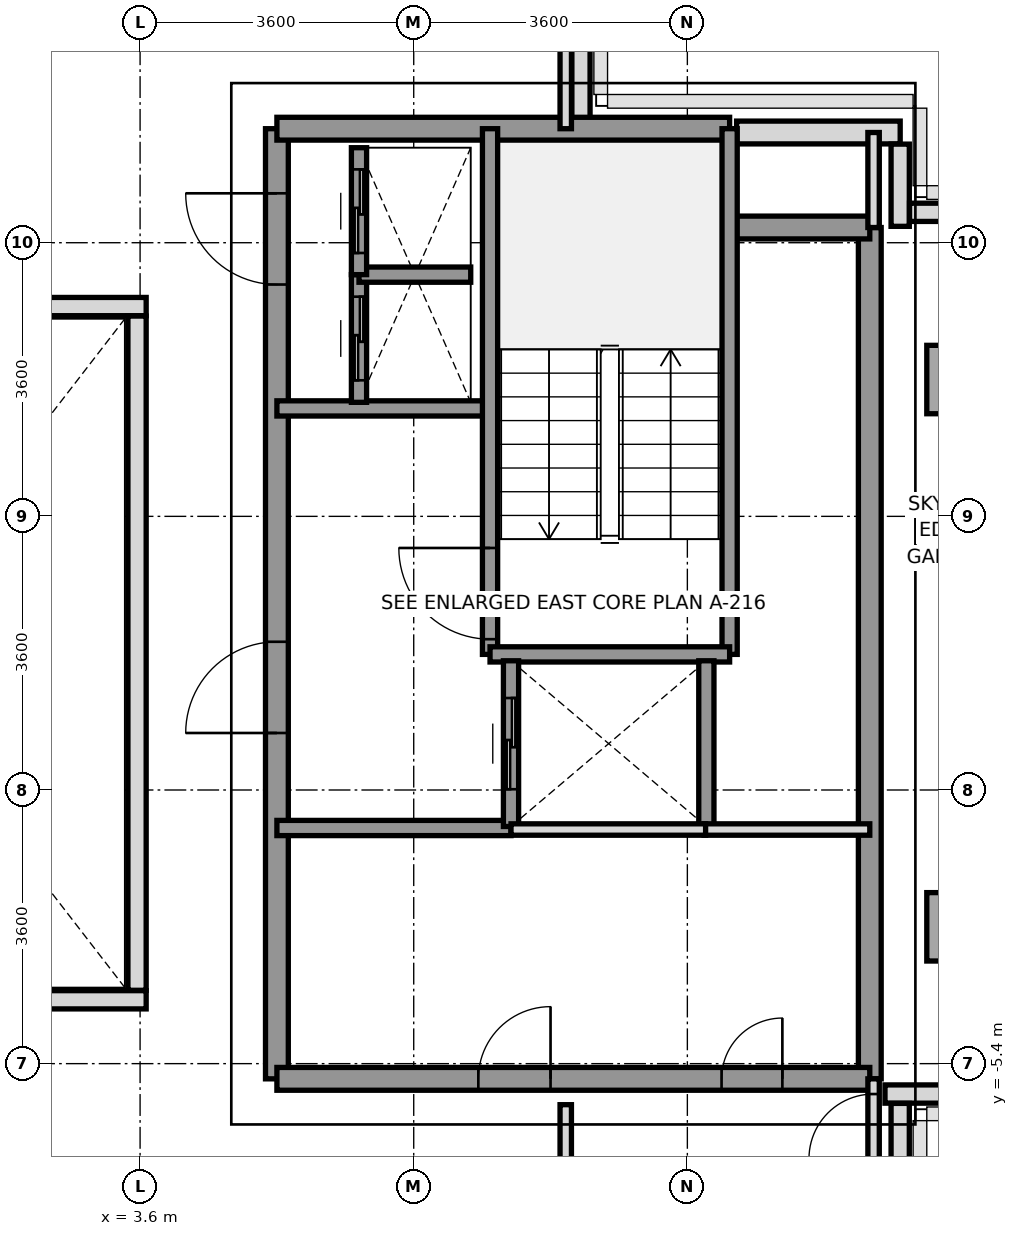
"""IFC4 building model, lengths in metres.
Left out: names, types, materials, properties, quantities, classifications, styles, units other than length and angle.
Written with IfcOpenShell. Run it as: python <this file> out.ifc"""

import sys

from ifc_helpers import new_model, si_unit, direction, frame, frame_2d, origin, origin_2d, place, context, subcontext, project, spatial, rectangle, extrude, source, transform, mapped, element, fill, save


model = new_model("IFC4")
c1 = context("Model", 3, precision=1e-05, world=origin(), true_north=direction((0.0, 1.0)))
c2 = subcontext(c1, "Body", "Model", "MODEL_VIEW")
j1 = project(units=[si_unit("LENGTHUNIT", "METRE"), si_unit("PLANEANGLEUNIT", "RADIAN")], contexts=[c1])
p1 = place(None, origin())
s1 = spatial("IfcSite", under=j1, at=p1, CompositionType="ELEMENT")
p2 = place(p1, origin())
s2 = spatial("IfcBuilding", under=s1, at=p2, CompositionType="ELEMENT")
p3 = place(p2, frame((0.0, 0.0, 252.4)))
s3 = spatial("IfcBuildingStorey", under=s2, at=p3, CompositionType="ELEMENT", Elevation=252.4)
m1 = source(origin(), c2, "Body", "SweptSolid", [
    extrude(rectangle(XDim=0.9, YDim=0.9, at=origin_2d()), origin(), (0.0, 0.0, 1.0), 3.01),
])
for number, where, z_axis, x_axis in (
    (1, (14.4, -3.6, 0.0), (0.0, 0.0, 1.0), (1.0, 0.0, 0.0)),
    (2, (14.4, 3.6, 0.0), (0.0, 0.0, 1.0), (1.0, 0.0, 0.0)),
):
    element("IfcColumn", number, at=place(p3, frame(where, z_axis=z_axis, x_axis=x_axis)), inside=s3, PredefinedType="COLUMN", context=c2, shape_type="MappedRepresentation", body=[
        mapped(m1, transform((0.0, 0.0, 0.0), x_axis=(1.0, 0.0, 0.0), y_axis=(0.0, 1.0, 0.0), z_axis=(0.0, 0.0, 1.0), scale=1.0)),
    ])
p4 = place(p3, frame((11.448, 6.85, 0.0), z_axis=(0.0, 0.0, 1.0), x_axis=(1.0, 0.0, 0.0)))
e3 = element("IfcWall", 3, at=p4, inside=s3, PredefinedType="SOLIDWALL", context=c2, shape_type="SweptSolid", body=[
    extrude(rectangle(XDim=2.152, YDim=0.3, at=frame_2d((1.076, 0.0))), origin(), (0.0, 0.0, 1.0), 3.01),
])
p5 = place(p3, frame((14.677, -5.8, 0.0), z_axis=(0.0, 0.0, 1.0), x_axis=(-1.0, 0.0, 0.0)))
e4 = element("IfcWall", 4, at=p5, inside=s3, PredefinedType="PARAPET", context=c2, shape_type="SweptSolid", body=[
    extrude(rectangle(XDim=1.277, YDim=0.24, at=frame_2d((0.639, 0.0))), origin(), (0.0, 0.0, 1.0), 1.15),
])
p6 = place(p3, frame((13.6, -5.923, 0.0), z_axis=(0.0, 0.0, 1.0), x_axis=(0.0, -1.0, 0.0)))
e5 = element("IfcWall", 5, at=p6, inside=s3, PredefinedType="PARAPET", context=c2, shape_type="SweptSolid", body=[
    extrude(rectangle(XDim=1.077, YDim=0.24, at=frame_2d((0.539, 0.0))), origin(), (0.0, 0.0, 1.0), 1.15),
])
p7 = place(p3, frame((9.4, 8.622, 0.0), z_axis=(0.0, 0.0, 1.0), x_axis=(0.0, -1.0, 0.0)))
e6 = element("IfcWall", 6, at=p7, inside=s3, PredefinedType="PARAPET", context=c2, shape_type="SweptSolid", body=[
    extrude(rectangle(XDim=1.669, YDim=0.24, at=frame_2d((0.834, 0.0))), origin(), (0.0, 0.0, 1.0), 1.15),
])
p8 = place(p3, frame((13.6, 6.697, 0.0), z_axis=(0.0, 0.0, 1.0), x_axis=(0.0, -1.0, 0.0)))
e7 = element("IfcWall", 7, at=p8, inside=s3, PredefinedType="PARAPET", context=c2, shape_type="SweptSolid", body=[
    extrude(rectangle(XDim=1.082, YDim=0.24, at=frame_2d((0.541, 0.0))), origin(), (0.0, 0.0, 1.0), 1.15),
])
p9 = place(p3, frame((13.723, 5.8, 0.0), z_axis=(0.0, 0.0, 1.0), x_axis=(1.0, 0.0, 0.0)))
e8 = element("IfcWall", 8, at=p9, inside=s3, PredefinedType="PARAPET", context=c2, shape_type="SweptSolid", body=[
    extrude(rectangle(XDim=1.077, YDim=0.24, at=frame_2d((0.539, 0.0))), origin(), (0.0, 0.0, 1.0), 1.15),
])
p10 = place(p3, frame((13.2, -5.6, 0.0), z_axis=(0.0, 0.0, 1.0), x_axis=(0.0, 1.0, 0.0)))
e9 = element("IfcWall", 9, at=p10, inside=s3, PredefinedType="SHEAR", context=c2, shape_type="SweptSolid", body=[
    extrude(rectangle(XDim=11.2, YDim=0.3, at=frame_2d((5.6, 0.0))), origin(), (0.0, 0.0, 1.0), 3.01),
])
p11 = place(p3, frame((5.4, -5.6, 0.0), z_axis=(0.0, 0.0, 1.0), x_axis=(0.0, 1.0, 0.0)))
e10 = element("IfcWall", 10, at=p11, inside=s3, PredefinedType="SHEAR", context=c2, shape_type="SweptSolid", body=[
    extrude(rectangle(XDim=12.5, YDim=0.3, at=frame_2d((6.25, 0.0))), origin(), (0.0, 0.0, 1.0), 3.01),
])
p12 = place(p11, frame((4.55, 0.0, 0.0)))
e11 = element("IfcOpeningElement", 11, at=p12, cuts=e10, PredefinedType="OPENING", context=c2, shape_type="SweptSolid", body=[
    extrude(rectangle(XDim=1.2, YDim=2.2, at=frame_2d((0.6, 1.1))), frame((0.0, 0.16, 0.0), z_axis=(0.0, -1.0, 0.0), x_axis=(1.0, 0.0, 0.0)), (0.0, 0.0, 1.0), 0.32),
])
p13 = place(p11, frame((10.45, 0.0, 0.0)))
e12 = element("IfcOpeningElement", 12, at=p13, cuts=e10, PredefinedType="OPENING", context=c2, shape_type="SweptSolid", body=[
    extrude(rectangle(XDim=1.2, YDim=2.2, at=frame_2d((0.6, 1.1))), frame((0.0, 0.16, 0.0), z_axis=(0.0, -1.0, 0.0), x_axis=(1.0, 0.0, 0.0)), (0.0, 0.0, 1.0), 0.32),
])
p14 = place(p3, frame((5.4, 6.9, 0.0), z_axis=(0.0, 0.0, 1.0), x_axis=(1.0, 0.0, 0.0)))
e13 = element("IfcWall", 13, at=p14, inside=s3, PredefinedType="SHEAR", context=c2, shape_type="SweptSolid", body=[
    extrude(rectangle(XDim=5.956, YDim=0.3, at=frame_2d((2.978, 0.0))), origin(), (0.0, 0.0, 1.0), 3.01),
])
p15 = place(p3, frame((11.356, 5.6, 0.0), z_axis=(0.0, 0.0, 1.0), x_axis=(1.0, 0.0, 0.0)))
e14 = element("IfcWall", 14, at=p15, inside=s3, PredefinedType="SHEAR", context=c2, shape_type="SweptSolid", body=[
    extrude(rectangle(XDim=1.844, YDim=0.3, at=frame_2d((0.922, 0.0))), origin(), (0.0, 0.0, 1.0), 3.01),
])
p16 = place(p3, frame((5.4, -5.6, 0.0), z_axis=(0.0, 0.0, 1.0), x_axis=(1.0, 0.0, 0.0)))
e15 = element("IfcWall", 15, at=p16, inside=s3, PredefinedType="SHEAR", context=c2, shape_type="SweptSolid", body=[
    extrude(rectangle(XDim=7.8, YDim=0.3, at=frame_2d((3.9, 0.0))), origin(), (0.0, 0.0, 1.0), 3.01),
])
p17 = place(p16, frame((5.85, 0.0, 0.0)))
e16 = element("IfcOpeningElement", 16, at=p17, cuts=e15, PredefinedType="OPENING", context=c2, shape_type="SweptSolid", body=[
    extrude(rectangle(XDim=0.8, YDim=2.1, at=frame_2d((0.4, 1.05))), frame((0.0, 0.16, 0.0), z_axis=(0.0, -1.0, 0.0), x_axis=(1.0, 0.0, 0.0)), (0.0, 0.0, 1.0), 0.32),
])
p18 = place(p16, frame((2.65, 0.0, 0.0)))
e17 = element("IfcOpeningElement", 17, at=p18, cuts=e15, PredefinedType="OPENING", context=c2, shape_type="SweptSolid", body=[
    extrude(rectangle(XDim=0.95, YDim=2.15, at=frame_2d((0.475, 1.075))), frame((0.0, 0.16, 0.0), z_axis=(0.0, -1.0, 0.0), x_axis=(1.0, 0.0, 0.0)), (0.0, 0.0, 1.0), 0.32),
])
p19 = place(p3, frame((5.4, 3.22, 0.0), z_axis=(0.0, 0.0, 1.0), x_axis=(1.0, 0.0, 0.0)))
e18 = element("IfcWall", 18, at=p19, inside=s3, PredefinedType="SOLIDWALL", context=c2, shape_type="SweptSolid", body=[
    extrude(rectangle(XDim=2.78, YDim=0.2, at=frame_2d((1.39, 0.0))), origin(), (0.0, 0.0, 1.0), 3.01),
])
p20 = place(p3, frame((5.4, -2.3, 0.0), z_axis=(0.0, 0.0, 1.0), x_axis=(1.0, 0.0, 0.0)))
e19 = element("IfcWall", 19, at=p20, inside=s3, PredefinedType="SOLIDWALL", context=c2, shape_type="SweptSolid", body=[
    extrude(rectangle(XDim=3.08, YDim=0.2, at=frame_2d((1.54, 0.0))), origin(), (0.0, 0.0, 1.0), 3.01),
])
p21 = place(p3, frame((8.204, -0.016, 0.0), z_axis=(0.0, 0.0, 1.0), x_axis=(0.0, 1.0, 0.0)))
e20 = element("IfcWall", 20, at=p21, inside=s3, PredefinedType="SOLIDWALL", context=c2, shape_type="SweptSolid", body=[
    extrude(rectangle(XDim=6.916, YDim=0.2, at=frame_2d((3.458, 0.0))), origin(), (0.0, 0.0, 1.0), 3.01),
])
p22 = place(p21, frame((0.2, 0.0, 0.0)))
e21 = element("IfcOpeningElement", 21, at=p22, cuts=e20, PredefinedType="OPENING", context=c2, shape_type="SweptSolid", body=[
    extrude(rectangle(XDim=1.2, YDim=2.2, at=frame_2d((0.6, 1.1))), frame((0.0, 0.11, 0.0), z_axis=(0.0, -1.0, 0.0), x_axis=(1.0, 0.0, 0.0)), (0.0, 0.0, 1.0), 0.22),
])
p23 = place(p3, frame((11.356, -0.016, 0.0), z_axis=(0.0, 0.0, 1.0), x_axis=(0.0, 1.0, 0.0)))
e22 = element("IfcWall", 22, at=p23, inside=s3, PredefinedType="SOLIDWALL", context=c2, shape_type="SweptSolid", body=[
    extrude(rectangle(XDim=6.916, YDim=0.2, at=frame_2d((3.458, 0.0))), origin(), (0.0, 0.0, 1.0), 3.01),
])
p24 = place(p3, frame((8.204, -0.016, 0.0), z_axis=(0.0, 0.0, 1.0), x_axis=(1.0, 0.0, 0.0)))
e23 = element("IfcWall", 23, at=p24, inside=s3, PredefinedType="SOLIDWALL", context=c2, shape_type="SweptSolid", body=[
    extrude(rectangle(XDim=3.152, YDim=0.2, at=frame_2d((1.576, 0.0))), origin(), (0.0, 0.0, 1.0), 3.01),
])
p25 = place(p3, frame((8.48, -2.28, 0.0), z_axis=(0.0, 0.0, 1.0), x_axis=(0.0, 1.0, 0.0)))
e24 = element("IfcWall", 24, at=p25, inside=s3, PredefinedType="SOLIDWALL", context=c2, shape_type="SweptSolid", body=[
    extrude(rectangle(XDim=2.18, YDim=0.2, at=frame_2d((1.09, 0.0))), origin(), (0.0, 0.0, 1.0), 3.01),
])
p26 = place(p25, frame((0.49, 0.0, 0.0)))
e25 = element("IfcOpeningElement", 25, at=p26, cuts=e24, PredefinedType="OPENING", context=c2, shape_type="SweptSolid", body=[
    extrude(rectangle(XDim=1.2, YDim=2.2, at=frame_2d((0.6, 1.1))), frame((0.0, 0.11, 0.0), z_axis=(0.0, -1.0, 0.0), x_axis=(1.0, 0.0, 0.0)), (0.0, 0.0, 1.0), 0.22),
])
p27 = place(p3, frame((11.05, -2.28, 0.0), z_axis=(0.0, 0.0, 1.0), x_axis=(0.0, 1.0, 0.0)))
e26 = element("IfcWall", 26, at=p27, inside=s3, PredefinedType="SOLIDWALL", context=c2, shape_type="SweptSolid", body=[
    extrude(rectangle(XDim=2.18, YDim=0.2, at=frame_2d((1.09, 0.0))), origin(), (0.0, 0.0, 1.0), 3.01),
])
p28 = place(p3, frame((6.48, 3.3, 0.0), z_axis=(0.0, 0.0, 1.0), x_axis=(0.0, 1.0, 0.0)))
e27 = element("IfcWall", 27, at=p28, inside=s3, PredefinedType="SOLIDWALL", context=c2, shape_type="SweptSolid", body=[
    extrude(rectangle(XDim=1.68, YDim=0.2, at=frame_2d((0.84, 0.0))), origin(), (0.0, 0.0, 1.0), 3.01),
])
p29 = place(p28, frame((0.29, 0.0, 0.0)))
e28 = element("IfcOpeningElement", 28, at=p29, cuts=e27, PredefinedType="OPENING", context=c2, shape_type="SweptSolid", body=[
    extrude(rectangle(XDim=1.1, YDim=2.2, at=frame_2d((0.55, 1.1))), frame((0.0, 0.11, 0.0), z_axis=(0.0, -1.0, 0.0), x_axis=(1.0, 0.0, 0.0)), (0.0, 0.0, 1.0), 0.22),
])
p30 = place(p3, frame((6.48, 4.98, 0.0), z_axis=(0.0, 0.0, 1.0), x_axis=(1.0, 0.0, 0.0)))
e29 = element("IfcWall", 29, at=p30, inside=s3, PredefinedType="SOLIDWALL", context=c2, shape_type="SweptSolid", body=[
    extrude(rectangle(XDim=1.47, YDim=0.2, at=frame_2d((0.735, 0.0))), origin(), (0.0, 0.0, 1.0), 3.01),
])
p31 = place(p3, frame((6.48, 4.98, 0.0), z_axis=(0.0, 0.0, 1.0), x_axis=(0.0, 1.0, 0.0)))
e30 = element("IfcWall", 30, at=p31, inside=s3, PredefinedType="SOLIDWALL", context=c2, shape_type="SweptSolid", body=[
    extrude(rectangle(XDim=1.67, YDim=0.2, at=frame_2d((0.835, 0.0))), origin(), (0.0, 0.0, 1.0), 3.01),
])
p32 = place(p31, frame((0.285, 0.0, 0.0)))
e31 = element("IfcOpeningElement", 31, at=p32, cuts=e30, PredefinedType="OPENING", context=c2, shape_type="SweptSolid", body=[
    extrude(rectangle(XDim=1.1, YDim=2.2, at=frame_2d((0.55, 1.1))), frame((0.0, 0.11, 0.0), z_axis=(0.0, -1.0, 0.0), x_axis=(1.0, 0.0, 0.0)), (0.0, 0.0, 1.0), 0.22),
])
p33 = place(p3, frame((11.02, -2.32, 0.0), z_axis=(0.0, 0.0, 1.0), x_axis=(1.0, 0.0, 0.0)))
e32 = element("IfcWall", 32, at=p33, inside=s3, PredefinedType="PARTITIONING", context=c2, shape_type="SweptSolid", body=[
    extrude(rectangle(XDim=2.18, YDim=0.15, at=frame_2d((1.09, 0.0))), origin(), (0.0, 0.0, 1.0), 3.01),
])
p34 = place(p3, frame((8.48, -2.32, 0.0), z_axis=(0.0, 0.0, 1.0), x_axis=(1.0, 0.0, 0.0)))
e33 = element("IfcWall", 33, at=p34, inside=s3, PredefinedType="PARTITIONING", context=c2, shape_type="SweptSolid", body=[
    extrude(rectangle(XDim=2.56, YDim=0.15, at=frame_2d((1.28, 0.0))), origin(), (0.0, 0.0, 1.0), 3.01),
])
p35 = place(p3, frame((9.2, 6.9, 0.0), z_axis=(0.0, 0.0, 1.0), x_axis=(0.0, 1.0, 0.0)))
e34 = element("IfcWall", 34, at=p35, inside=s3, PredefinedType="PARTITIONING", context=c2, shape_type="SweptSolid", body=[
    extrude(rectangle(XDim=3.38, YDim=0.15, at=frame_2d((1.69, 0.0))), origin(), (0.0, 0.0, 1.0), 2.61),
])
p36 = place(p3, frame((9.2, -10.28, 0.0), z_axis=(0.0, 0.0, 1.0), x_axis=(0.0, 1.0, 0.0)))
e35 = element("IfcWall", 35, at=p36, inside=s3, PredefinedType="PARTITIONING", context=c2, shape_type="SweptSolid", body=[
    extrude(rectangle(XDim=4.34, YDim=0.15, at=frame_2d((2.17, 0.0))), origin(), (0.0, 0.0, 1.0), 2.61),
])
p37 = place(p3, frame((13.25, 5.6, 0.0), z_axis=(0.0, 0.0, 1.0), x_axis=(0.0, 1.0, 0.0)))
e36 = element("IfcWall", 36, at=p37, inside=s3, PredefinedType="PARTITIONING", context=c2, shape_type="SweptSolid", body=[
    extrude(rectangle(XDim=1.25, YDim=0.15, at=frame_2d((0.625, 0.0))), origin(), (0.0, 0.0, 1.0), 3.01),
])
p38 = place(p3, frame((13.25, -6.85, 0.0), z_axis=(0.0, 0.0, 1.0), x_axis=(0.0, 1.0, 0.0)))
e37 = element("IfcWall", 37, at=p38, inside=s3, PredefinedType="PARTITIONING", context=c2, shape_type="SweptSolid", body=[
    extrude(rectangle(XDim=1.25, YDim=0.15, at=frame_2d((0.625, 0.0))), origin(), (0.0, 0.0, 1.0), 3.01),
])
p39 = place(p38, frame((0.2, 0.0, 0.0)))
e38 = element("IfcOpeningElement", 38, at=p39, cuts=e37, PredefinedType="OPENING", context=c2, shape_type="SweptSolid", body=[
    extrude(rectangle(XDim=0.85, YDim=2.1, at=frame_2d((0.425, 1.05))), frame((0.0, 0.085, 0.0), z_axis=(0.0, -1.0, 0.0), x_axis=(1.0, 0.0, 0.0)), (0.0, 0.0, 1.0), 0.17),
])
for number, where, z_axis, x_axis in (
    (39, (-3.68, -4.56, 0.0), (0.0, 0.0, 1.0), (1.0, 0.0, 0.0)),
    (40, (-3.68, 4.56, 0.0), (0.0, 0.0, 1.0), (1.0, 0.0, 0.0)),
):
    element("IfcWall", number, at=place(p3, frame(where, z_axis=z_axis, x_axis=x_axis)), inside=s3, PredefinedType="PARAPET", context=c2, shape_type="SweptSolid", body=[
        extrude(rectangle(XDim=7.36, YDim=0.24, at=frame_2d((3.68, 0.0))), origin(), (0.0, 0.0, 1.0), 1.15),
    ])
p40 = place(p3, frame((3.56, -4.435, 0.0), z_axis=(0.0, 0.0, 1.0), x_axis=(0.0, 1.0, 0.0)))
e41 = element("IfcWall", 41, at=p40, inside=s3, PredefinedType="PARAPET", context=c2, shape_type="SweptSolid", body=[
    extrude(rectangle(XDim=8.87, YDim=0.24, at=frame_2d((4.435, 0.0))), origin(), (0.0, 0.0, 1.0), 1.15),
])
m2 = source(origin(), c2, "Body", "SweptSolid", [
    extrude(rectangle(XDim=1.2, YDim=2.2, at=frame_2d((0.6, 1.1))), frame((0.0, 0.025, 0.0), z_axis=(0.0, -1.0, 0.0), x_axis=(1.0, 0.0, 0.0)), (0.0, 0.0, 1.0), 0.05),
])
p41 = place(p22, origin())
e42 = element("IfcDoor", 42, at=p41, inside=s3, OperationType="SINGLE_SWING_RIGHT", PredefinedType="DOOR", context=c2, shape_type="MappedRepresentation", body=[
    mapped(m2, transform((0.0, 0.0, 0.0), x_axis=(1.0, 0.0, 0.0), y_axis=(0.0, 1.0, 0.0), z_axis=(0.0, 0.0, 1.0), scale=1.0)),
])
fill(e21, e42)
p42 = place(p12, origin())
e43 = element("IfcDoor", 43, at=p42, inside=s3, OperationType="SINGLE_SWING_LEFT", PredefinedType="DOOR", context=c2, shape_type="MappedRepresentation", body=[
    mapped(m2, transform((0.0, 0.0, 0.0), x_axis=(1.0, 0.0, 0.0), y_axis=(0.0, 1.0, 0.0), z_axis=(0.0, 0.0, 1.0), scale=1.0)),
])
fill(e11, e43)
p43 = place(p13, origin())
e44 = element("IfcDoor", 44, at=p43, inside=s3, OperationType="SINGLE_SWING_RIGHT", PredefinedType="DOOR", context=c2, shape_type="MappedRepresentation", body=[
    mapped(m2, transform((0.0, 0.0, 0.0), x_axis=(1.0, 0.0, 0.0), y_axis=(0.0, 1.0, 0.0), z_axis=(0.0, 0.0, 1.0), scale=1.0)),
])
fill(e12, e44)
m3 = source(origin(), c2, "Body", "SweptSolid", [
    extrude(rectangle(XDim=0.8, YDim=2.1, at=frame_2d((0.4, 1.05))), frame((0.0, 0.025, 0.0), z_axis=(0.0, -1.0, 0.0), x_axis=(1.0, 0.0, 0.0)), (0.0, 0.0, 1.0), 0.05),
])
p44 = place(p17, origin())
e45 = element("IfcDoor", 45, at=p44, inside=s3, OperationType="SINGLE_SWING_RIGHT", PredefinedType="DOOR", context=c2, shape_type="MappedRepresentation", body=[
    mapped(m3, transform((0.0, 0.0, 0.0), x_axis=(1.0, 0.0, 0.0), y_axis=(0.0, 1.0, 0.0), z_axis=(0.0, 0.0, 1.0), scale=1.0)),
])
fill(e16, e45)
m4 = source(origin(), c2, "Body", "SweptSolid", [
    extrude(rectangle(XDim=0.95, YDim=2.15, at=frame_2d((0.475, 1.075))), frame((0.0, 0.025, 0.0), z_axis=(0.0, -1.0, 0.0), x_axis=(1.0, 0.0, 0.0)), (0.0, 0.0, 1.0), 0.05),
])
p45 = place(p18, origin())
e46 = element("IfcDoor", 46, at=p45, inside=s3, OperationType="SINGLE_SWING_RIGHT", PredefinedType="DOOR", context=c2, shape_type="MappedRepresentation", body=[
    mapped(m4, transform((0.0, 0.0, 0.0), x_axis=(1.0, 0.0, 0.0), y_axis=(0.0, 1.0, 0.0), z_axis=(0.0, 0.0, 1.0), scale=1.0)),
])
fill(e17, e46)
p46 = place(p26, origin())
e47 = element("IfcDoor", 47, at=p46, inside=s3, OperationType="SLIDING_TO_RIGHT", PredefinedType="DOOR", context=c2, shape_type="MappedRepresentation", body=[
    mapped(m2, transform((0.0, 0.0, 0.0), x_axis=(1.0, 0.0, 0.0), y_axis=(0.0, 1.0, 0.0), z_axis=(0.0, 0.0, 1.0), scale=1.0)),
])
fill(e25, e47)
m5 = source(origin(), c2, "Body", "SweptSolid", [
    extrude(rectangle(XDim=1.1, YDim=2.2, at=frame_2d((0.55, 1.1))), frame((0.0, 0.025, 0.0), z_axis=(0.0, -1.0, 0.0), x_axis=(1.0, 0.0, 0.0)), (0.0, 0.0, 1.0), 0.05),
])
p47 = place(p29, origin())
e48 = element("IfcDoor", 48, at=p47, inside=s3, OperationType="SLIDING_TO_LEFT", PredefinedType="DOOR", context=c2, shape_type="MappedRepresentation", body=[
    mapped(m5, transform((0.0, 0.0, 0.0), x_axis=(1.0, 0.0, 0.0), y_axis=(0.0, 1.0, 0.0), z_axis=(0.0, 0.0, 1.0), scale=1.0)),
])
fill(e28, e48)
p48 = place(p32, origin())
e49 = element("IfcDoor", 49, at=p48, inside=s3, OperationType="SLIDING_TO_LEFT", PredefinedType="DOOR", context=c2, shape_type="MappedRepresentation", body=[
    mapped(m5, transform((0.0, 0.0, 0.0), x_axis=(1.0, 0.0, 0.0), y_axis=(0.0, 1.0, 0.0), z_axis=(0.0, 0.0, 1.0), scale=1.0)),
])
fill(e31, e49)
m6 = source(origin(), c2, "Body", "SweptSolid", [
    extrude(rectangle(XDim=0.85, YDim=2.1, at=frame_2d((0.425, 1.05))), frame((0.0, 0.025, 0.0), z_axis=(0.0, -1.0, 0.0), x_axis=(1.0, 0.0, 0.0)), (0.0, 0.0, 1.0), 0.05),
])
p49 = place(p39, origin())
e50 = element("IfcDoor", 50, at=p49, inside=s3, OperationType="SINGLE_SWING_LEFT", PredefinedType="DOOR", context=c2, shape_type="MappedRepresentation", body=[
    mapped(m6, transform((0.0, 0.0, 0.0), x_axis=(1.0, 0.0, 0.0), y_axis=(0.0, 1.0, 0.0), z_axis=(0.0, 0.0, 1.0), scale=1.0)),
])
fill(e38, e50)
save(model, sys.argv[1])
